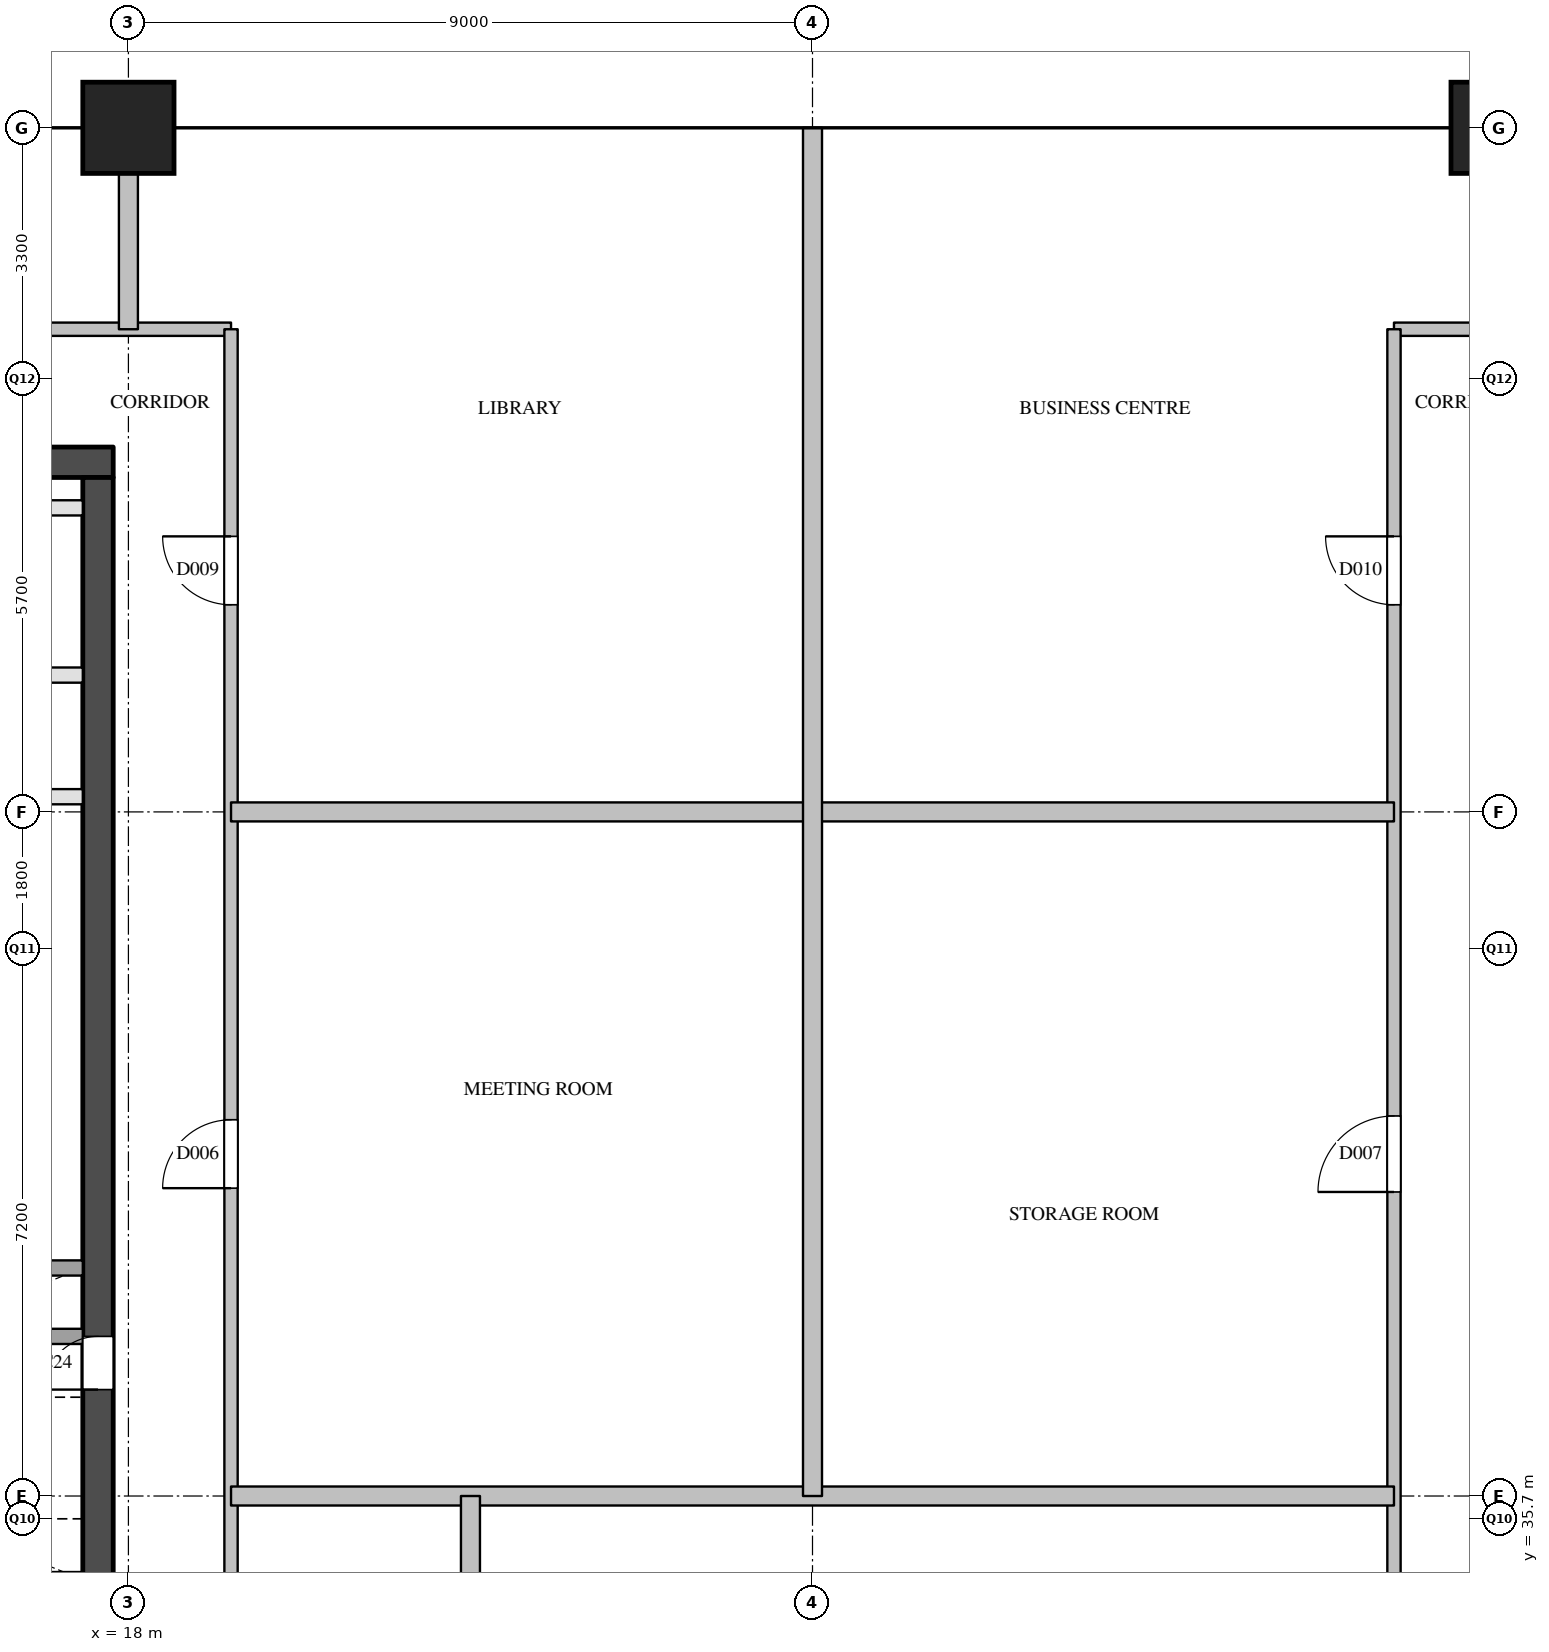
"""IFC4 building model, lengths in metres.
Left out: names, types, materials, properties, quantities, classifications, styles, units other than length and angle.
Written with IfcOpenShell. Run it as: python <this file> out.ifc"""

import sys

from ifc_helpers import new_model, si_unit, direction, frame, frame_2d, origin, origin_2d, place, context, subcontext, project, spatial, rectangle, extrude, element, fill, save


model = new_model("IFC4")
c1 = context("Model", 3, precision=1e-05, world=origin(), true_north=direction((0.0, 1.0)))
c2 = subcontext(c1, "Body", "Model", "MODEL_VIEW")
j1 = project(units=[si_unit("LENGTHUNIT", "METRE"), si_unit("PLANEANGLEUNIT", "RADIAN")], contexts=[c1])
p1 = place(None, origin())
s1 = spatial("IfcSite", under=j1, at=p1, CompositionType="ELEMENT")
p2 = place(p1, origin())
s2 = spatial("IfcBuilding", under=s1, at=p2, CompositionType="ELEMENT")
p3 = place(p2, frame((0.0, 0.0, 230.6)))
s3 = spatial("IfcBuildingStorey", under=s2, at=p3, CompositionType="ELEMENT", Elevation=230.6)
for number, where, z_axis, x_axis in (
    (1, (18.0, 54.0, 0.0), (0.0, 0.0, 1.0), (1.0, 0.0, 0.0)),
    (2, (36.0, 54.0, 0.0), (0.0, 0.0, 1.0), (1.0, 0.0, 0.0)),
):
    element("IfcColumn", number, at=place(p3, frame(where, z_axis=z_axis, x_axis=x_axis)), inside=s3, PredefinedType="COLUMN", context=c2, shape_type="SweptSolid", body=[
        extrude(rectangle(XDim=1.2, YDim=1.2, at=origin_2d()), origin(), (0.0, 0.0, 1.0), 3.9),
    ])
p4 = place(p3, frame((5.8, 49.6, 0.0), z_axis=(0.0, 0.0, 1.0), x_axis=(1.0, 0.0, 0.0)))
e3 = element("IfcWall", 3, at=p4, inside=s3, PredefinedType="SHEAR", context=c2, shape_type="SweptSolid", body=[
    extrude(rectangle(XDim=12.0, YDim=0.4, at=frame_2d((6.0, 0.0))), origin(), (0.0, 0.0, 1.0), 3.6),
])
p5 = place(p3, frame((17.6, 29.1, 0.0), z_axis=(0.0, 0.0, 1.0), x_axis=(0.0, 1.0, 0.0)))
e4 = element("IfcWall", 4, at=p5, inside=s3, PredefinedType="SHEAR", context=c2, shape_type="SweptSolid", body=[
    extrude(rectangle(XDim=20.3, YDim=0.4, at=frame_2d((10.15, 0.0))), origin(), (0.0, 0.0, 1.0), 3.6),
])
p6 = place(p5, frame((1.25, 0.0, 0.0)))
e5 = element("IfcOpeningElement", 5, at=p6, cuts=e4, PredefinedType="OPENING", context=c2, shape_type="SweptSolid", body=[
    extrude(rectangle(XDim=0.7, YDim=2.1, at=frame_2d((0.35, 1.05))), frame((0.0, 0.21, 0.0), z_axis=(0.0, -1.0, 0.0), x_axis=(1.0, 0.0, 0.0)), (0.0, 0.0, 1.0), 0.42),
])
p7 = place(p5, frame((8.3, 0.0, 0.0)))
e6 = element("IfcOpeningElement", 6, at=p7, cuts=e4, PredefinedType="OPENING", context=c2, shape_type="SweptSolid", body=[
    extrude(rectangle(XDim=0.7, YDim=2.1, at=frame_2d((0.35, 1.05))), frame((0.0, 0.21, 0.0), z_axis=(0.0, -1.0, 0.0), x_axis=(1.0, 0.0, 0.0)), (0.0, 0.0, 1.0), 0.42),
])
p8 = place(p5, frame((3.6, 0.0, 0.0)))
e7 = element("IfcOpeningElement", 7, at=p8, cuts=e4, PredefinedType="OPENING", context=c2, shape_type="SweptSolid", body=[
    extrude(rectangle(XDim=1.8, YDim=2.1, at=frame_2d((0.9, 1.05))), frame((0.0, 0.21, 0.0), z_axis=(0.0, -1.0, 0.0), x_axis=(1.0, 0.0, 0.0)), (0.0, 0.0, 1.0), 0.42),
])
p9 = place(p3, frame((6.2, 38.1, 0.0), z_axis=(0.0, 0.0, 1.0), x_axis=(1.0, 0.0, 0.0)))
e8 = element("IfcWall", 8, at=p9, inside=s3, PredefinedType="SOLIDWALL", context=c2, shape_type="SweptSolid", body=[
    extrude(rectangle(XDim=11.2, YDim=0.2, at=frame_2d((5.6, 0.0))), origin(), (0.0, 0.0, 1.0), 3.6),
])
p10 = place(p9, frame((8.85, 0.0, 0.0)))
e9 = element("IfcOpeningElement", 9, at=p10, cuts=e8, PredefinedType="OPENING", context=c2, shape_type="SweptSolid", body=[
    extrude(rectangle(XDim=1.2, YDim=2.1, at=frame_2d((0.6, 1.05))), frame((0.0, 0.11, 0.0), z_axis=(0.0, -1.0, 0.0), x_axis=(1.0, 0.0, 0.0)), (0.0, 0.0, 1.0), 0.22),
])
p11 = place(p3, frame((12.5, 39.0, 0.0), z_axis=(0.0, 0.0, 1.0), x_axis=(1.0, 0.0, 0.0)))
e10 = element("IfcWall", 10, at=p11, inside=s3, PredefinedType="SOLIDWALL", context=c2, shape_type="SweptSolid", body=[
    extrude(rectangle(XDim=4.9, YDim=0.2, at=frame_2d((2.45, 0.0))), origin(), (0.0, 0.0, 1.0), 3.6),
])
p12 = place(p3, frame((12.5, 45.2, 0.0), z_axis=(0.0, 0.0, 1.0), x_axis=(1.0, 0.0, 0.0)))
e11 = element("IfcWall", 11, at=p12, inside=s3, PredefinedType="PARTITIONING", context=c2, shape_type="SweptSolid", body=[
    extrude(rectangle(XDim=4.9, YDim=0.2, at=frame_2d((2.45, 0.0))), origin(), (0.0, 0.0, 1.0), 3.6),
])
p13 = place(p12, frame((1.02, 0.0, 0.0)))
e12 = element("IfcOpeningElement", 12, at=p13, cuts=e11, PredefinedType="OPENING", context=c2, shape_type="SweptSolid", body=[
    extrude(rectangle(XDim=0.9, YDim=2.1, at=frame_2d((0.45, 1.05))), frame((0.0, 0.11, 0.0), z_axis=(0.0, -1.0, 0.0), x_axis=(1.0, 0.0, 0.0)), (0.0, 0.0, 1.0), 0.22),
])
p14 = place(p12, frame((3.47, 0.0, 0.0)))
e13 = element("IfcOpeningElement", 13, at=p14, cuts=e11, PredefinedType="OPENING", context=c2, shape_type="SweptSolid", body=[
    extrude(rectangle(XDim=0.9, YDim=2.1, at=frame_2d((0.45, 1.05))), frame((0.0, 0.11, 0.0), z_axis=(0.0, -1.0, 0.0), x_axis=(1.0, 0.0, 0.0)), (0.0, 0.0, 1.0), 0.22),
])
p15 = place(p3, frame((6.2, 46.8, 0.0), z_axis=(0.0, 0.0, 1.0), x_axis=(1.0, 0.0, 0.0)))
e14 = element("IfcWall", 14, at=p15, inside=s3, PredefinedType="PARTITIONING", context=c2, shape_type="SweptSolid", body=[
    extrude(rectangle(XDim=11.2, YDim=0.2, at=frame_2d((5.6, 0.0))), origin(), (0.0, 0.0, 1.0), 3.6),
])
p16 = place(p15, frame((2.35, 0.0, 0.0)))
e15 = element("IfcOpeningElement", 15, at=p16, cuts=e14, PredefinedType="OPENING", context=c2, shape_type="SweptSolid", body=[
    extrude(rectangle(XDim=0.9, YDim=2.1, at=frame_2d((0.45, 1.05))), frame((0.0, 0.11, 0.0), z_axis=(0.0, -1.0, 0.0), x_axis=(1.0, 0.0, 0.0)), (0.0, 0.0, 1.0), 0.22),
])
p17 = place(p15, frame((7.95, 0.0, 0.0)))
e16 = element("IfcOpeningElement", 16, at=p17, cuts=e14, PredefinedType="OPENING", context=c2, shape_type="SweptSolid", body=[
    extrude(rectangle(XDim=0.9, YDim=2.1, at=frame_2d((0.45, 1.05))), frame((0.0, 0.11, 0.0), z_axis=(0.0, -1.0, 0.0), x_axis=(1.0, 0.0, 0.0)), (0.0, 0.0, 1.0), 0.22),
])
p18 = place(p3, frame((6.2, 49.0, 0.0), z_axis=(0.0, 0.0, 1.0), x_axis=(1.0, 0.0, 0.0)))
e17 = element("IfcWall", 17, at=p18, inside=s3, PredefinedType="PARTITIONING", context=c2, shape_type="SweptSolid", body=[
    extrude(rectangle(XDim=11.2, YDim=0.2, at=frame_2d((5.6, 0.0))), origin(), (0.0, 0.0, 1.0), 3.6),
])
p19 = place(p3, frame((4.25, 51.35, 0.0), z_axis=(0.0, 0.0, 1.0), x_axis=(1.0, 0.0, 0.0)))
e18 = element("IfcWall", 18, at=p19, inside=s3, PredefinedType="PARTITIONING", context=c2, shape_type="SweptSolid", body=[
    extrude(rectangle(XDim=15.1, YDim=0.175, at=frame_2d((7.55, 0.0))), origin(), (0.0, 0.0, 1.0), 3.6),
])
p20 = place(p19, frame((8.75, 0.0, 0.0)))
e19 = element("IfcOpeningElement", 19, at=p20, cuts=e18, PredefinedType="OPENING", context=c2, shape_type="SweptSolid", body=[
    extrude(rectangle(XDim=1.0, YDim=2.1, at=frame_2d((0.5, 1.05))), frame((0.0, 0.097, 0.0), z_axis=(0.0, -1.0, 0.0), x_axis=(1.0, 0.0, 0.0)), (0.0, 0.0, 1.0), 0.195),
])
p21 = place(p3, frame((34.65, 51.35, 0.0), z_axis=(0.0, 0.0, 1.0), x_axis=(1.0, 0.0, 0.0)))
e20 = element("IfcWall", 20, at=p21, inside=s3, PredefinedType="PARTITIONING", context=c2, shape_type="SweptSolid", body=[
    extrude(rectangle(XDim=15.1, YDim=0.175, at=frame_2d((7.55, 0.0))), origin(), (0.0, 0.0, 1.0), 3.6),
])
p22 = place(p21, frame((5.4, 0.0, 0.0)))
e21 = element("IfcOpeningElement", 21, at=p22, cuts=e20, PredefinedType="OPENING", context=c2, shape_type="SweptSolid", body=[
    extrude(rectangle(XDim=0.9, YDim=2.1, at=frame_2d((0.45, 1.05))), frame((0.0, 0.097, 0.0), z_axis=(0.0, -1.0, 0.0), x_axis=(1.0, 0.0, 0.0)), (0.0, 0.0, 1.0), 0.195),
])
p23 = place(p3, frame((19.35, 28.5, 0.0), z_axis=(0.0, 0.0, 1.0), x_axis=(0.0, 1.0, 0.0)))
e22 = element("IfcWall", 22, at=p23, inside=s3, PredefinedType="PARTITIONING", context=c2, shape_type="SweptSolid", body=[
    extrude(rectangle(XDim=22.85, YDim=0.175, at=frame_2d((11.425, 0.0))), origin(), (0.0, 0.0, 1.0), 3.6),
])
p24 = place(p23, frame((3.3, 0.0, 0.0)))
e23 = element("IfcOpeningElement", 23, at=p24, cuts=e22, PredefinedType="OPENING", context=c2, shape_type="SweptSolid", body=[
    extrude(rectangle(XDim=0.9, YDim=2.1, at=frame_2d((0.45, 1.05))), frame((0.0, 0.097, 0.0), z_axis=(0.0, -1.0, 0.0), x_axis=(1.0, 0.0, 0.0)), (0.0, 0.0, 1.0), 0.195),
])
p25 = place(p23, frame((11.55, 0.0, 0.0)))
e24 = element("IfcOpeningElement", 24, at=p25, cuts=e22, PredefinedType="OPENING", context=c2, shape_type="SweptSolid", body=[
    extrude(rectangle(XDim=0.9, YDim=2.1, at=frame_2d((0.45, 1.05))), frame((0.0, 0.097, 0.0), z_axis=(0.0, -1.0, 0.0), x_axis=(1.0, 0.0, 0.0)), (0.0, 0.0, 1.0), 0.195),
])
p26 = place(p23, frame((19.225, 0.0, 0.0)))
e25 = element("IfcOpeningElement", 25, at=p26, cuts=e22, PredefinedType="OPENING", context=c2, shape_type="SweptSolid", body=[
    extrude(rectangle(XDim=0.9, YDim=2.1, at=frame_2d((0.45, 1.05))), frame((0.0, 0.097, 0.0), z_axis=(0.0, -1.0, 0.0), x_axis=(1.0, 0.0, 0.0)), (0.0, 0.0, 1.0), 0.195),
])
p27 = place(p3, frame((34.65, 28.5, 0.0), z_axis=(0.0, 0.0, 1.0), x_axis=(0.0, 1.0, 0.0)))
e26 = element("IfcWall", 26, at=p27, inside=s3, PredefinedType="PARTITIONING", context=c2, shape_type="SweptSolid", body=[
    extrude(rectangle(XDim=22.85, YDim=0.175, at=frame_2d((11.425, 0.0))), origin(), (0.0, 0.0, 1.0), 3.6),
])
p28 = place(p27, frame((3.3, 0.0, 0.0)))
e27 = element("IfcOpeningElement", 27, at=p28, cuts=e26, PredefinedType="OPENING", context=c2, shape_type="SweptSolid", body=[
    extrude(rectangle(XDim=0.9, YDim=2.1, at=frame_2d((0.45, 1.05))), frame((0.0, 0.097, 0.0), z_axis=(0.0, -1.0, 0.0), x_axis=(1.0, 0.0, 0.0)), (0.0, 0.0, 1.0), 0.195),
])
p29 = place(p27, frame((11.5, 0.0, 0.0)))
e28 = element("IfcOpeningElement", 28, at=p29, cuts=e26, PredefinedType="OPENING", context=c2, shape_type="SweptSolid", body=[
    extrude(rectangle(XDim=1.0, YDim=2.1, at=frame_2d((0.5, 1.05))), frame((0.0, 0.097, 0.0), z_axis=(0.0, -1.0, 0.0), x_axis=(1.0, 0.0, 0.0)), (0.0, 0.0, 1.0), 0.195),
])
p30 = place(p27, frame((19.225, 0.0, 0.0)))
e29 = element("IfcOpeningElement", 29, at=p30, cuts=e26, PredefinedType="OPENING", context=c2, shape_type="SweptSolid", body=[
    extrude(rectangle(XDim=0.9, YDim=2.1, at=frame_2d((0.45, 1.05))), frame((0.0, 0.097, 0.0), z_axis=(0.0, -1.0, 0.0), x_axis=(1.0, 0.0, 0.0)), (0.0, 0.0, 1.0), 0.195),
])
for number, where, z_axis, x_axis in (
    (30, (19.35, 36.0, 0.0), (0.0, 0.0, 1.0), (1.0, 0.0, 0.0)),
    (31, (19.35, 45.0, 0.0), (0.0, 0.0, 1.0), (1.0, 0.0, 0.0)),
):
    element("IfcWall", number, at=place(p3, frame(where, z_axis=z_axis, x_axis=x_axis)), inside=s3, PredefinedType="PARTITIONING", context=c2, shape_type="SweptSolid", body=[
        extrude(rectangle(XDim=15.3, YDim=0.25, at=frame_2d((7.65, 0.0))), origin(), (0.0, 0.0, 1.0), 3.6),
    ])
p31 = place(p3, frame((18.0, 51.35, 0.0), z_axis=(0.0, 0.0, 1.0), x_axis=(0.0, 1.0, 0.0)))
e32 = element("IfcWall", 32, at=p31, inside=s3, PredefinedType="PARTITIONING", context=c2, shape_type="SweptSolid", body=[
    extrude(rectangle(XDim=2.65, YDim=0.25, at=frame_2d((1.325, 0.0))), origin(), (0.0, 0.0, 1.0), 3.6),
])
p32 = place(p3, frame((22.5, 27.0, 0.0), z_axis=(0.0, 0.0, 1.0), x_axis=(0.0, 1.0, 0.0)))
e33 = element("IfcWall", 33, at=p32, inside=s3, PredefinedType="PARTITIONING", context=c2, shape_type="SweptSolid", body=[
    extrude(rectangle(XDim=9.0, YDim=0.25, at=frame_2d((4.5, 0.0))), origin(), (0.0, 0.0, 1.0), 3.6),
])
p33 = place(p3, frame((27.0, 36.0, 0.0), z_axis=(0.0, 0.0, 1.0), x_axis=(0.0, 1.0, 0.0)))
e34 = element("IfcWall", 34, at=p33, inside=s3, PredefinedType="PARTITIONING", context=c2, shape_type="SweptSolid", body=[
    extrude(rectangle(XDim=18.0, YDim=0.25, at=frame_2d((9.0, 0.0))), origin(), (0.0, 0.0, 1.0), 3.6),
])
p34 = place(p7, origin())
e35 = element("IfcDoor", 35, at=p34, inside=s3, OperationType="SINGLE_SWING_LEFT", PredefinedType="DOOR", context=c2, shape_type="SweptSolid", body=[
    extrude(rectangle(XDim=0.7, YDim=2.1, at=frame_2d((0.35, 1.05))), frame((0.0, 0.025, 0.0), z_axis=(0.0, -1.0, 0.0), x_axis=(1.0, 0.0, 0.0)), (0.0, 0.0, 1.0), 0.05),
])
fill(e6, e35)
p35 = place(p25, origin())
e36 = element("IfcDoor", 36, at=p35, inside=s3, OperationType="SINGLE_SWING_LEFT", PredefinedType="DOOR", context=c2, shape_type="SweptSolid", body=[
    extrude(rectangle(XDim=0.9, YDim=2.1, at=frame_2d((0.45, 1.05))), frame((0.0, 0.025, 0.0), z_axis=(0.0, -1.0, 0.0), x_axis=(1.0, 0.0, 0.0)), (0.0, 0.0, 1.0), 0.05),
])
fill(e24, e36)
p36 = place(p29, origin())
e37 = element("IfcDoor", 37, at=p36, inside=s3, OperationType="SINGLE_SWING_LEFT", PredefinedType="DOOR", context=c2, shape_type="SweptSolid", body=[
    extrude(rectangle(XDim=1.0, YDim=2.1, at=frame_2d((0.5, 1.05))), frame((0.0, 0.025, 0.0), z_axis=(0.0, -1.0, 0.0), x_axis=(1.0, 0.0, 0.0)), (0.0, 0.0, 1.0), 0.05),
])
fill(e28, e37)
p37 = place(p26, origin())
e38 = element("IfcDoor", 38, at=p37, inside=s3, OperationType="SINGLE_SWING_RIGHT", PredefinedType="DOOR", context=c2, shape_type="SweptSolid", body=[
    extrude(rectangle(XDim=0.9, YDim=2.1, at=frame_2d((0.45, 1.05))), frame((0.0, 0.025, 0.0), z_axis=(0.0, -1.0, 0.0), x_axis=(1.0, 0.0, 0.0)), (0.0, 0.0, 1.0), 0.05),
])
fill(e25, e38)
p38 = place(p30, origin())
e39 = element("IfcDoor", 39, at=p38, inside=s3, OperationType="SINGLE_SWING_RIGHT", PredefinedType="DOOR", context=c2, shape_type="SweptSolid", body=[
    extrude(rectangle(XDim=0.9, YDim=2.1, at=frame_2d((0.45, 1.05))), frame((0.0, 0.025, 0.0), z_axis=(0.0, -1.0, 0.0), x_axis=(1.0, 0.0, 0.0)), (0.0, 0.0, 1.0), 0.05),
])
fill(e29, e39)
save(model, sys.argv[1])
